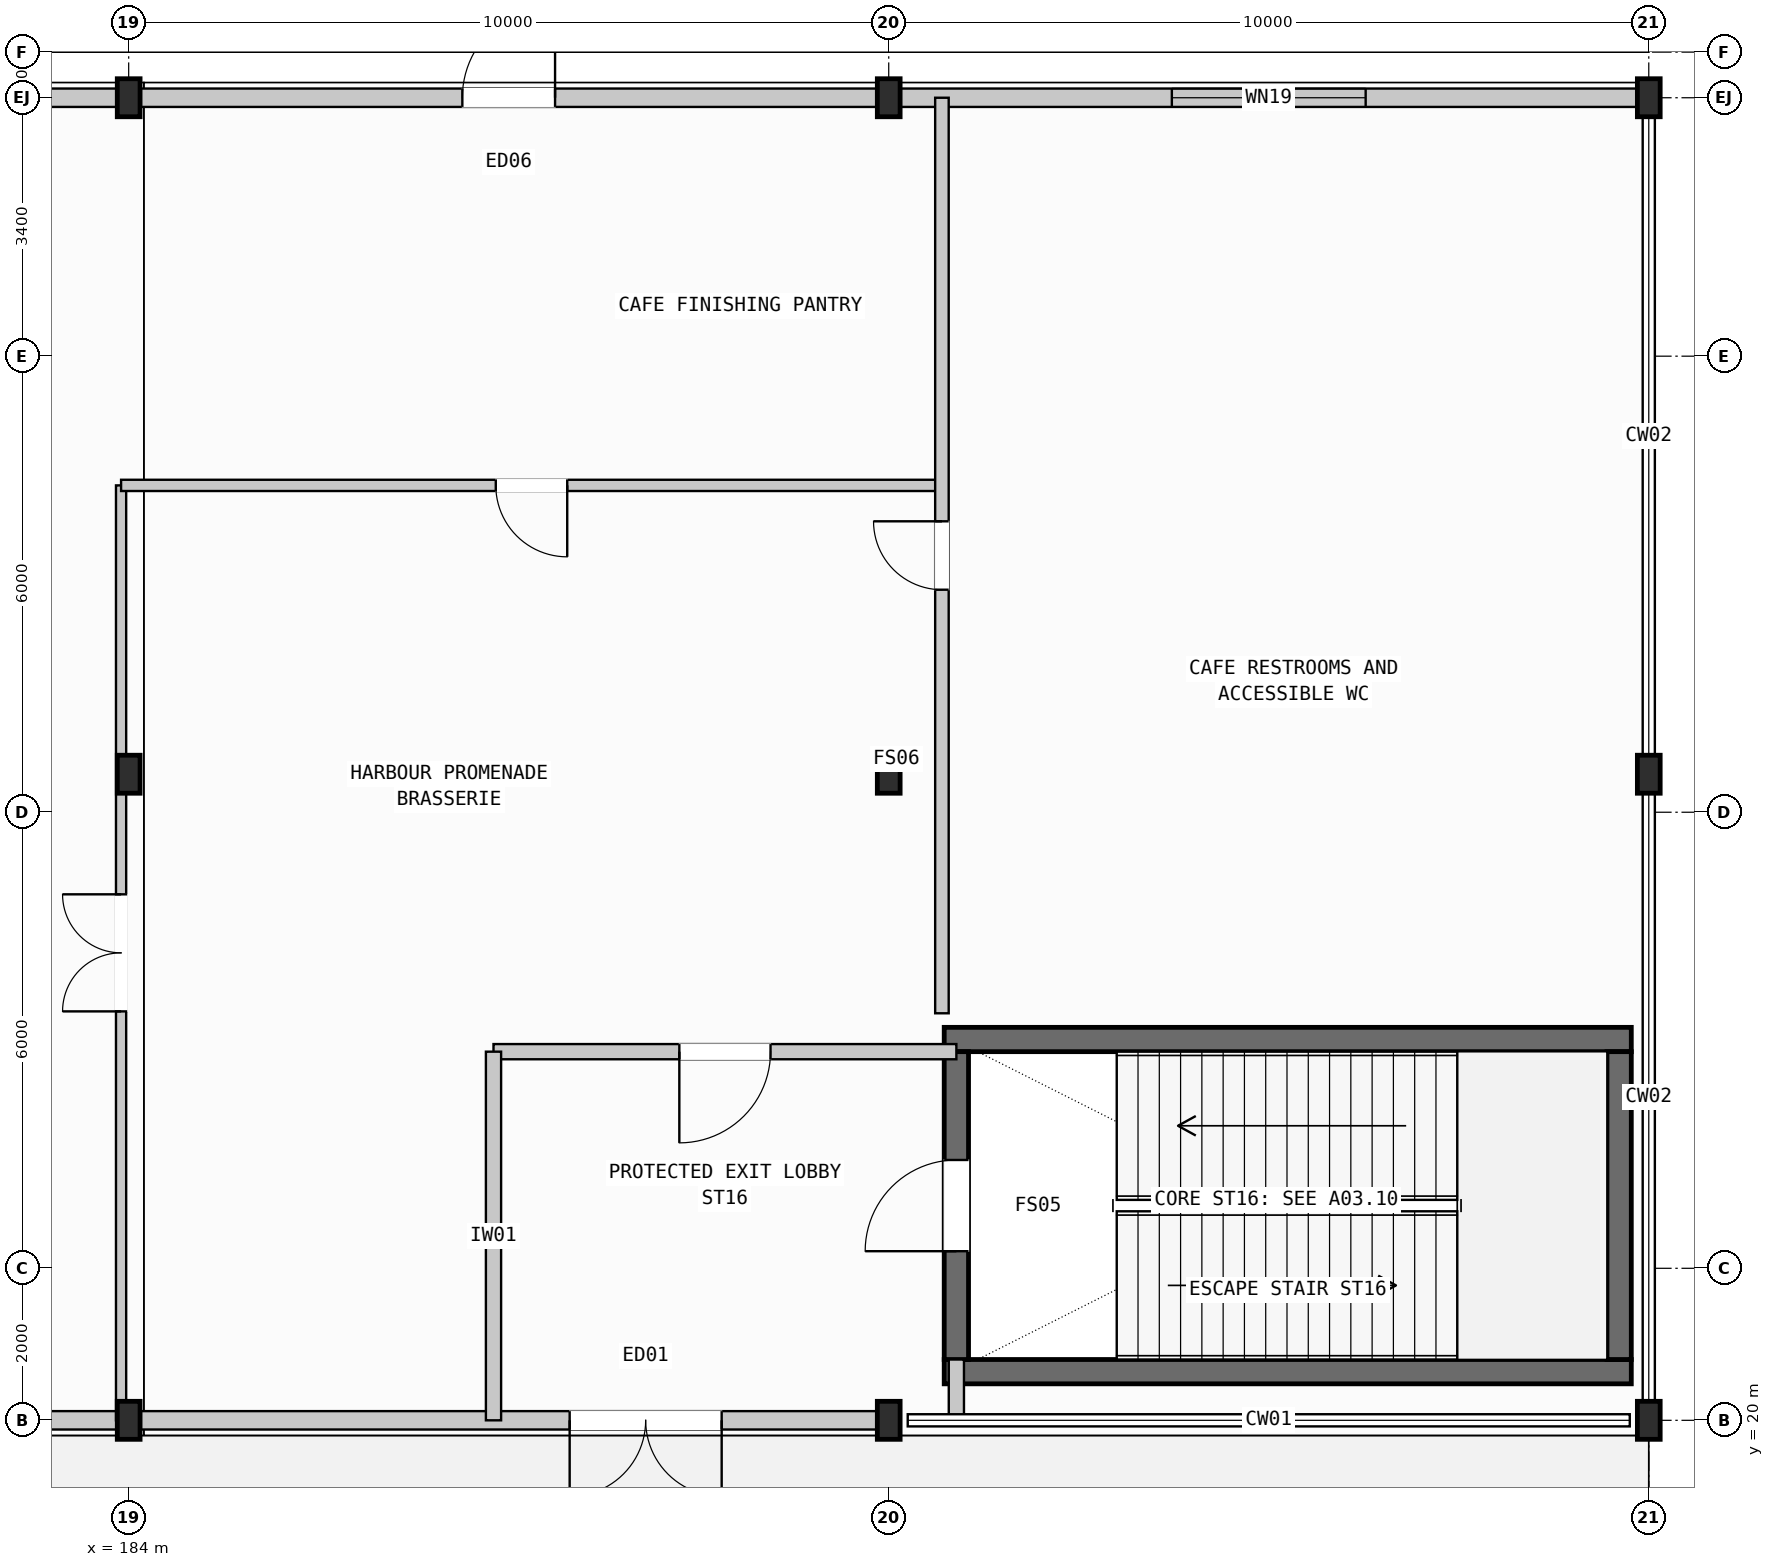
"""IFC4 building model, lengths in metres.
Left out: names, types, materials, properties, quantities, classifications, styles, units other than length and angle.
Written with IfcOpenShell. Run it as: python <this file> out.ifc"""

import sys

from ifc_helpers import new_model, si_unit, direction, frame, frame_2d, origin, origin_2d, place, context, subcontext, project, spatial, rectangle, i_section, extrude, element, fill, save


model = new_model("IFC4")
c1 = context("Model", 3, precision=1e-05, world=origin(), true_north=direction((0.0, 1.0)))
c2 = subcontext(c1, "Body", "Model", "MODEL_VIEW")
j1 = project(units=[si_unit("LENGTHUNIT", "METRE"), si_unit("PLANEANGLEUNIT", "RADIAN")], contexts=[c1])
p1 = place(None, origin())
s1 = spatial("IfcSite", under=j1, at=p1, CompositionType="ELEMENT")
p2 = place(p1, origin())
s2 = spatial("IfcBuilding", under=s1, at=p2, CompositionType="ELEMENT")
p3 = place(p2, origin())
s3 = spatial("IfcBuildingStorey", under=s2, at=p3, CompositionType="ELEMENT", Elevation=0.0)
for number, where, z_axis, x_axis in (
    (1, (184.0, 20.0, 0.0), (0.0, 0.0, 1.0), (1.0, 0.0, 0.0)),
    (2, (184.0, 28.5, 0.0), (0.0, 0.0, 1.0), (1.0, 0.0, 0.0)),
    (3, (184.0, 37.4, 0.0), (0.0, 0.0, 1.0), (1.0, 0.0, 0.0)),
    (4, (194.0, 20.0, 0.0), (0.0, 0.0, 1.0), (1.0, 0.0, 0.0)),
    (5, (194.0, 28.5, 0.0), (0.0, 0.0, 1.0), (1.0, 0.0, 0.0)),
    (6, (194.0, 37.4, 0.0), (0.0, 0.0, 1.0), (1.0, 0.0, 0.0)),
    (7, (204.0, 20.0, 0.0), (0.0, 0.0, 1.0), (1.0, 0.0, 0.0)),
    (8, (204.0, 28.5, 0.0), (0.0, 0.0, 1.0), (1.0, 0.0, 0.0)),
    (9, (204.0, 37.4, 0.0), (0.0, 0.0, 1.0), (1.0, 0.0, 0.0)),
):
    element("IfcColumn", number, at=place(p3, frame(where, z_axis=z_axis, x_axis=x_axis)), inside=s3, PredefinedType="COLUMN", context=c2, shape_type="SweptSolid", body=[
        extrude(i_section(OverallWidth=0.3, OverallDepth=0.5, WebThickness=0.014, FlangeThickness=0.028, FilletRadius=0.027, at=origin_2d()), origin(), (0.0, 0.0, 1.0), 6.0),
    ])
for number, where, z_axis, x_axis in (
    (10, (194.73, 20.64, 0.0), (0.0, 0.0, 1.0), (1.0, 0.0, 0.0)),
    (11, (194.73, 25.01, 0.0), (0.0, 0.0, 1.0), (1.0, 0.0, 0.0)),
):
    element("IfcWall", number, at=place(p3, frame(where, z_axis=z_axis, x_axis=x_axis)), inside=s3, PredefinedType="SHEAR", context=c2, shape_type="SweptSolid", body=[
        extrude(rectangle(XDim=9.04, YDim=0.32, at=frame_2d((4.52, 0.0))), origin(), (0.0, 0.0, 1.0), 6.0),
    ])
p4 = place(p3, frame((194.89, 20.8, 0.0), z_axis=(0.0, 0.0, 1.0), x_axis=(0.0, 1.0, 0.0)))
e12 = element("IfcWall", 12, at=p4, inside=s3, PredefinedType="SHEAR", context=c2, shape_type="SweptSolid", body=[
    extrude(rectangle(XDim=4.05, YDim=0.32, at=frame_2d((2.025, 0.0))), origin(), (0.0, 0.0, 1.0), 6.0),
])
p5 = place(p4, frame((1.425, 0.0, 0.0)))
e13 = element("IfcOpeningElement", 13, at=p5, cuts=e12, PredefinedType="OPENING", context=c2, shape_type="SweptSolid", body=[
    extrude(rectangle(XDim=1.2, YDim=2.2, at=frame_2d((0.6, 1.1))), frame((0.0, 0.17, 0.0), z_axis=(0.0, -1.0, 0.0), x_axis=(1.0, 0.0, 0.0)), (0.0, 0.0, 1.0), 0.34),
])
p6 = place(p3, frame((203.61, 20.8, 0.0), z_axis=(0.0, 0.0, 1.0), x_axis=(0.0, 1.0, 0.0)))
e14 = element("IfcWall", 14, at=p6, inside=s3, PredefinedType="SHEAR", context=c2, shape_type="SweptSolid", body=[
    extrude(rectangle(XDim=4.05, YDim=0.32, at=frame_2d((2.025, 0.0))), origin(), (0.0, 0.0, 1.0), 6.0),
])
p7 = place(p3, frame((174.146, 20.0, 0.0), z_axis=(0.0, 0.0, 1.0), x_axis=(1.0, 0.0, 0.0)))
e15 = element("IfcWall", 15, at=p7, inside=s3, PredefinedType="STANDARD", context=c2, shape_type="SweptSolid", body=[
    extrude(rectangle(XDim=9.708, YDim=0.242, at=frame_2d((4.854, 0.0))), origin(), (0.0, 0.0, 1.0), 5.1),
])
p8 = place(p7, frame((3.754, 0.0, 0.0)))
e16 = element("IfcOpeningElement", 16, at=p8, cuts=e15, PredefinedType="OPENING", context=c2, shape_type="SweptSolid", body=[
    extrude(rectangle(XDim=2.2, YDim=2.4, at=frame_2d((1.1, 1.2))), frame((0.0, 0.131, 0.0), z_axis=(0.0, -1.0, 0.0), x_axis=(1.0, 0.0, 0.0)), (0.0, 0.0, 1.0), 0.262),
])
p9 = place(p3, frame((174.146, 37.4, 0.0), z_axis=(0.0, 0.0, 1.0), x_axis=(1.0, 0.0, 0.0)))
e17 = element("IfcWall", 17, at=p9, inside=s3, PredefinedType="STANDARD", context=c2, shape_type="SweptSolid", body=[
    extrude(rectangle(XDim=9.708, YDim=0.242, at=frame_2d((4.854, 0.0))), origin(), (0.0, 0.0, 1.0), 5.1),
])
p10 = place(p3, frame((184.146, 20.0, 0.0), z_axis=(0.0, 0.0, 1.0), x_axis=(1.0, 0.0, 0.0)))
e18 = element("IfcWall", 18, at=p10, inside=s3, PredefinedType="STANDARD", context=c2, shape_type="SweptSolid", body=[
    extrude(rectangle(XDim=9.708, YDim=0.242, at=frame_2d((4.854, 0.0))), origin(), (0.0, 0.0, 1.0), 5.1),
])
p11 = place(p10, frame((5.656, 0.0, 0.0)))
e19 = element("IfcOpeningElement", 19, at=p11, cuts=e18, PredefinedType="OPENING", context=c2, shape_type="SweptSolid", body=[
    extrude(rectangle(XDim=2.0, YDim=2.3, at=frame_2d((1.0, 1.15))), frame((0.0, 0.131, 0.0), z_axis=(0.0, -1.0, 0.0), x_axis=(1.0, 0.0, 0.0)), (0.0, 0.0, 1.0), 0.262),
])
p12 = place(p3, frame((184.146, 37.4, 0.0), z_axis=(0.0, 0.0, 1.0), x_axis=(1.0, 0.0, 0.0)))
e20 = element("IfcWall", 20, at=p12, inside=s3, PredefinedType="STANDARD", context=c2, shape_type="SweptSolid", body=[
    extrude(rectangle(XDim=9.708, YDim=0.242, at=frame_2d((4.854, 0.0))), origin(), (0.0, 0.0, 1.0), 5.1),
])
p13 = place(p12, frame((4.244, 0.0, 0.0)))
e21 = element("IfcOpeningElement", 21, at=p13, cuts=e20, PredefinedType="OPENING", context=c2, shape_type="SweptSolid", body=[
    extrude(rectangle(XDim=1.22, YDim=2.28, at=frame_2d((0.61, 1.14))), frame((0.0, 0.131, 0.0), z_axis=(0.0, -1.0, 0.0), x_axis=(1.0, 0.0, 0.0)), (0.0, 0.0, 1.0), 0.262),
])
p14 = place(p3, frame((194.146, 37.4, 0.0), z_axis=(0.0, 0.0, 1.0), x_axis=(1.0, 0.0, 0.0)))
e22 = element("IfcWall", 22, at=p14, inside=s3, PredefinedType="STANDARD", context=c2, shape_type="SweptSolid", body=[
    extrude(rectangle(XDim=9.708, YDim=0.242, at=frame_2d((4.854, 0.0))), origin(), (0.0, 0.0, 1.0), 5.1),
])
p15 = place(p14, frame((3.579, 0.0, 1.0)))
e23 = element("IfcOpeningElement", 23, at=p15, cuts=e22, PredefinedType="OPENING", context=c2, shape_type="SweptSolid", body=[
    extrude(rectangle(XDim=2.55, YDim=1.5, at=frame_2d((1.275, 0.75))), frame((0.0, 0.131, 0.0), z_axis=(0.0, -1.0, 0.0), x_axis=(1.0, 0.0, 0.0)), (0.0, 0.0, 1.0), 0.262),
])
p16 = place(p3, frame((188.8, 24.85, 0.0), z_axis=(0.0, 0.0, 1.0), x_axis=(1.0, 0.0, 0.0)))
e24 = element("IfcWall", 24, at=p16, inside=s3, PredefinedType="PARTITIONING", context=c2, shape_type="SweptSolid", body=[
    extrude(rectangle(XDim=6.09, YDim=0.2, at=frame_2d((3.045, 0.0))), origin(), (0.0, 0.0, 1.0), 4.2),
])
p17 = place(p16, frame((2.445, 0.0, 0.0)))
e25 = element("IfcOpeningElement", 25, at=p17, cuts=e24, PredefinedType="OPENING", context=c2, shape_type="SweptSolid", body=[
    extrude(rectangle(XDim=1.2, YDim=2.2, at=frame_2d((0.6, 1.1))), frame((0.0, 0.11, 0.0), z_axis=(0.0, -1.0, 0.0), x_axis=(1.0, 0.0, 0.0)), (0.0, 0.0, 1.0), 0.22),
])
p18 = place(p3, frame((188.8, 20.0, 0.0), z_axis=(0.0, 0.0, 1.0), x_axis=(0.0, 1.0, 0.0)))
e26 = element("IfcWall", 26, at=p18, inside=s3, PredefinedType="PARTITIONING", context=c2, shape_type="SweptSolid", body=[
    extrude(rectangle(XDim=4.85, YDim=0.2, at=frame_2d((2.425, 0.0))), origin(), (0.0, 0.0, 1.0), 4.2),
])
p19 = place(p3, frame((194.89, 20.0, 0.0), z_axis=(0.0, 0.0, 1.0), x_axis=(0.0, 1.0, 0.0)))
e27 = element("IfcWall", 27, at=p19, inside=s3, PredefinedType="PARTITIONING", context=c2, shape_type="SweptSolid", body=[
    extrude(rectangle(XDim=0.8, YDim=0.2, at=frame_2d((0.4, 0.0))), origin(), (0.0, 0.0, 1.0), 4.2),
])
p20 = place(p3, frame((183.9, 20.0, 0.0), z_axis=(0.0, 0.0, 1.0), x_axis=(0.0, 1.0, 0.0)))
e28 = element("IfcWall", 28, at=p20, inside=s3, PredefinedType="PARTITIONING", context=c2, shape_type="SweptSolid", body=[
    extrude(rectangle(XDim=12.3, YDim=0.134, at=frame_2d((6.15, 0.0))), origin(), (0.0, 0.0, 1.0), 4.9),
])
p21 = place(p20, frame((5.38, 0.0, 0.0)))
e29 = element("IfcOpeningElement", 29, at=p21, cuts=e28, PredefinedType="OPENING", context=c2, shape_type="SweptSolid", body=[
    extrude(rectangle(XDim=1.54, YDim=2.24, at=frame_2d((0.77, 1.12))), frame((0.0, 0.077, 0.0), z_axis=(0.0, -1.0, 0.0), x_axis=(1.0, 0.0, 0.0)), (0.0, 0.0, 1.0), 0.154),
])
p22 = place(p3, frame((183.9, 32.3, 0.0), z_axis=(0.0, 0.0, 1.0), x_axis=(1.0, 0.0, 0.0)))
e30 = element("IfcWall", 30, at=p22, inside=s3, PredefinedType="PARTITIONING", context=c2, shape_type="SweptSolid", body=[
    extrude(rectangle(XDim=10.8, YDim=0.148, at=frame_2d((5.4, 0.0))), origin(), (0.0, 0.0, 1.0), 4.9),
])
p23 = place(p22, frame((4.93, 0.0, 0.0)))
e31 = element("IfcOpeningElement", 31, at=p23, cuts=e30, PredefinedType="OPENING", context=c2, shape_type="SweptSolid", body=[
    extrude(rectangle(XDim=0.94, YDim=2.12, at=frame_2d((0.47, 1.06))), frame((0.0, 0.084, 0.0), z_axis=(0.0, -1.0, 0.0), x_axis=(1.0, 0.0, 0.0)), (0.0, 0.0, 1.0), 0.168),
])
p24 = place(p3, frame((194.7, 25.355, 0.0), z_axis=(0.0, 0.0, 1.0), x_axis=(0.0, 1.0, 0.0)))
e32 = element("IfcWall", 32, at=p24, inside=s3, PredefinedType="PARTITIONING", context=c2, shape_type="SweptSolid", body=[
    extrude(rectangle(XDim=12.045, YDim=0.178, at=frame_2d((6.022, 0.0))), origin(), (0.0, 0.0, 1.0), 4.9),
])
p25 = place(p24, frame((5.573, 0.0, 0.0)))
e33 = element("IfcOpeningElement", 33, at=p25, cuts=e32, PredefinedType="OPENING", context=c2, shape_type="SweptSolid", body=[
    extrude(rectangle(XDim=0.9, YDim=2.08, at=frame_2d((0.45, 1.04))), frame((0.0, 0.099, 0.0), z_axis=(0.0, -1.0, 0.0), x_axis=(1.0, 0.0, 0.0)), (0.0, 0.0, 1.0), 0.198),
])
p26 = place(p13, origin())
e34 = element("IfcDoor", 34, at=p26, inside=s3, OperationType="SINGLE_SWING_RIGHT", PredefinedType="DOOR", context=c2, shape_type="SweptSolid", body=[
    extrude(rectangle(XDim=1.22, YDim=2.28, at=frame_2d((0.61, 1.14))), frame((0.0, 0.025, 0.0), z_axis=(0.0, -1.0, 0.0), x_axis=(1.0, 0.0, 0.0)), (0.0, 0.0, 1.0), 0.05),
])
fill(e21, e34)
p27 = place(p15, origin())
e35 = element("IfcWindow", 35, at=p27, inside=s3, PartitioningType="SINGLE_PANEL", PredefinedType="WINDOW", context=c2, shape_type="SweptSolid", body=[
    extrude(rectangle(XDim=2.55, YDim=1.5, at=frame_2d((1.275, 0.75))), frame((0.0, 0.03, 0.0), z_axis=(0.0, -1.0, 0.0), x_axis=(1.0, 0.0, 0.0)), (0.0, 0.0, 1.0), 0.06),
])
fill(e23, e35)
p28 = place(p5, origin())
e36 = element("IfcDoor", 36, at=p28, inside=s3, OperationType="SINGLE_SWING_LEFT", PredefinedType="DOOR", context=c2, shape_type="SweptSolid", body=[
    extrude(rectangle(XDim=1.2, YDim=2.2, at=frame_2d((0.6, 1.1))), frame((0.0, 0.025, 0.0), z_axis=(0.0, -1.0, 0.0), x_axis=(1.0, 0.0, 0.0)), (0.0, 0.0, 1.0), 0.05),
])
fill(e13, e36)
p29 = place(p11, frame((2.0, 0.0, 0.0), z_axis=(0.0, 0.0, 1.0), x_axis=(-1.0, 0.0, 0.0)))
e37 = element("IfcDoor", 37, at=p29, inside=s3, OperationType="DOUBLE_DOOR_SINGLE_SWING", PredefinedType="DOOR", context=c2, shape_type="SweptSolid", body=[
    extrude(rectangle(XDim=2.0, YDim=2.3, at=frame_2d((1.0, 1.15))), frame((0.0, 0.025, 0.0), z_axis=(0.0, -1.0, 0.0), x_axis=(1.0, 0.0, 0.0)), (0.0, 0.0, 1.0), 0.05),
])
fill(e19, e37)
p30 = place(p17, frame((1.2, 0.0, 0.0), z_axis=(0.0, 0.0, 1.0), x_axis=(-1.0, 0.0, 0.0)))
e38 = element("IfcDoor", 38, at=p30, inside=s3, OperationType="SINGLE_SWING_RIGHT", PredefinedType="DOOR", context=c2, shape_type="SweptSolid", body=[
    extrude(rectangle(XDim=1.2, YDim=2.2, at=frame_2d((0.6, 1.1))), frame((0.0, 0.025, 0.0), z_axis=(0.0, -1.0, 0.0), x_axis=(1.0, 0.0, 0.0)), (0.0, 0.0, 1.0), 0.05),
])
fill(e25, e38)
p31 = place(p21, origin())
e39 = element("IfcDoor", 39, at=p31, inside=s3, OperationType="DOUBLE_DOOR_SINGLE_SWING", PredefinedType="DOOR", context=c2, shape_type="SweptSolid", body=[
    extrude(rectangle(XDim=1.54, YDim=2.24, at=frame_2d((0.77, 1.12))), frame((0.0, 0.025, 0.0), z_axis=(0.0, -1.0, 0.0), x_axis=(1.0, 0.0, 0.0)), (0.0, 0.0, 1.0), 0.05),
])
fill(e29, e39)
p32 = place(p23, frame((0.94, 0.0, 0.0), z_axis=(0.0, 0.0, 1.0), x_axis=(-1.0, 0.0, 0.0)))
e40 = element("IfcDoor", 40, at=p32, inside=s3, OperationType="SINGLE_SWING_LEFT", PredefinedType="DOOR", context=c2, shape_type="SweptSolid", body=[
    extrude(rectangle(XDim=0.94, YDim=2.12, at=frame_2d((0.47, 1.06))), frame((0.0, 0.025, 0.0), z_axis=(0.0, -1.0, 0.0), x_axis=(1.0, 0.0, 0.0)), (0.0, 0.0, 1.0), 0.05),
])
fill(e31, e40)
p33 = place(p25, origin())
e41 = element("IfcDoor", 41, at=p33, inside=s3, OperationType="SINGLE_SWING_RIGHT", PredefinedType="DOOR", context=c2, shape_type="SweptSolid", body=[
    extrude(rectangle(XDim=0.9, YDim=2.08, at=frame_2d((0.45, 1.04))), frame((0.0, 0.025, 0.0), z_axis=(0.0, -1.0, 0.0), x_axis=(1.0, 0.0, 0.0)), (0.0, 0.0, 1.0), 0.05),
])
fill(e33, e41)
save(model, sys.argv[1])
